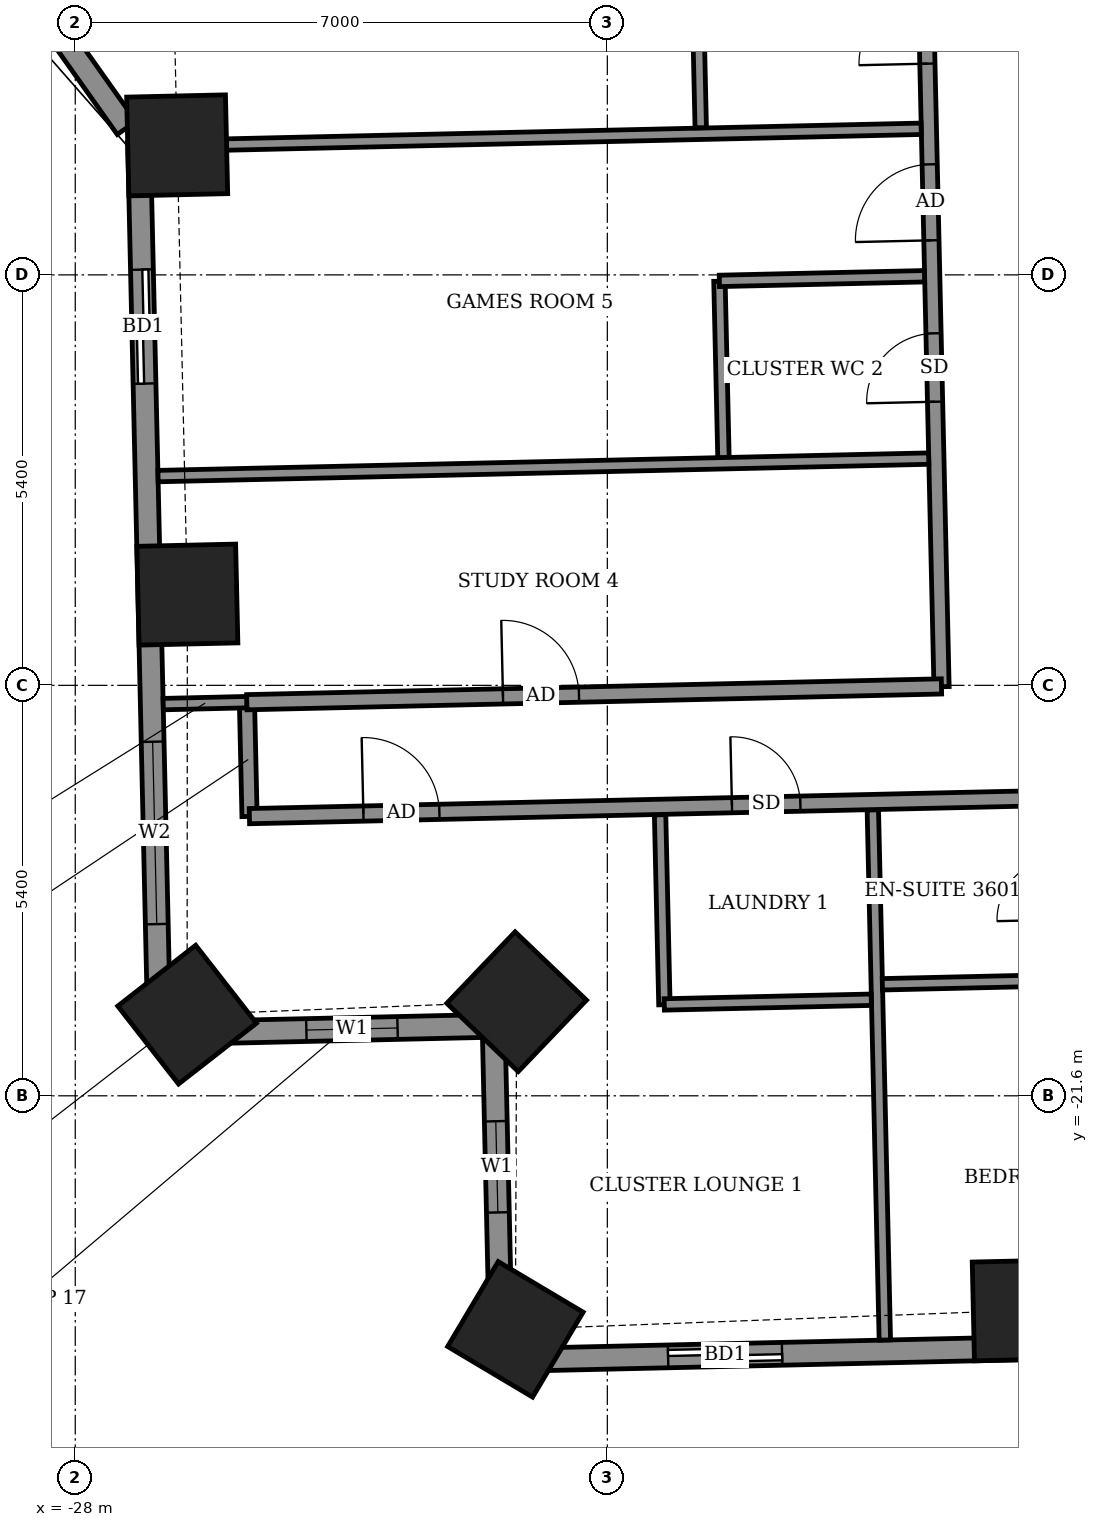
"""IFC4 building model, lengths in metres.
Left out: names, types, materials, properties, quantities, classifications, styles, units other than length and angle.
Written with IfcOpenShell. Run it as: python <this file> out.ifc"""

import sys

from ifc_helpers import new_model, si_unit, direction, frame, frame_2d, origin, origin_2d, place, context, subcontext, project, spatial, rectangle, extrude, element, fill, save


model = new_model("IFC4")
c1 = context("Model", 3, precision=1e-05, world=origin(), true_north=direction((0.0, 1.0)))
c2 = subcontext(c1, "Body", "Model", "MODEL_VIEW")
j1 = project(units=[si_unit("LENGTHUNIT", "METRE"), si_unit("PLANEANGLEUNIT", "RADIAN")], contexts=[c1])
p1 = place(None, origin())
s1 = spatial("IfcSite", under=j1, at=p1, CompositionType="ELEMENT")
p2 = place(p1, origin())
s2 = spatial("IfcBuilding", under=s1, at=p2, CompositionType="ELEMENT")
p3 = place(p2, frame((0.0, 0.0, 144.5)))
s3 = spatial("IfcBuildingStorey", under=s2, at=p3, CompositionType="ELEMENT", Elevation=144.5)
for number, where, z_axis, x_axis in (
    (1, (-26.659, -9.096, -0.55), (0.0, 0.0, 1.0), (0.023, -1.0, 0.0)),
    (2, (-26.525, -15.006, -0.55), (0.0, 0.0, 1.0), (0.023, -1.0, 0.0)),
    (3, (-26.529, -20.532, -0.55), (0.0, 0.0, 1.0), (0.615, -0.788, 0.0)),
    (4, (-22.193, -20.362, -0.55), (0.0, 0.0, 1.0), (0.723, -0.691, 0.0)),
    (5, (-22.209, -24.672, -0.55), (0.0, 0.0, 1.0), (0.859, -0.512, 0.0)),
    (6, (-15.535, -24.422, -0.55), (0.0, 0.0, 1.0), (1.0, 0.023, 0.0)),
):
    element("IfcColumn", number, at=place(p3, frame(where, z_axis=z_axis, x_axis=x_axis)), inside=s3, PredefinedType="COLUMN", context=c2, shape_type="SweptSolid", body=[
        extrude(rectangle(XDim=1.3, YDim=1.3, at=origin_2d()), origin(), (0.0, 0.0, 1.0), 3.6),
    ])
p4 = place(p3, frame((-29.388, -5.954, 0.0), z_axis=(0.0, 0.0, 1.0), x_axis=(0.578095163598, -0.815969351033, 0.0)))
e7 = element("IfcWall", 7, at=p4, inside=s3, PredefinedType="SOLIDWALL", context=c2, shape_type="SweptSolid", body=[
    extrude(rectangle(XDim=3.569, YDim=0.3, at=frame_2d((1.784, 0.0))), origin(), (0.0, 0.0, 1.0), 3.05),
])
p5 = place(p4, frame((0.338, 0.0, 0.9)))
e8 = element("IfcOpeningElement", 8, at=p5, cuts=e7, PredefinedType="OPENING", context=c2, shape_type="SweptSolid", body=[
    extrude(rectangle(XDim=1.2, YDim=1.5, at=frame_2d((0.6, 0.75))), frame((0.0, 0.16, 0.0), z_axis=(0.0, -1.0, 0.0), x_axis=(1.0, 0.0, 0.0)), (0.0, 0.0, 1.0), 0.32),
])
p6 = place(p3, frame((-27.161, -9.052, 0.0), z_axis=(0.0, 0.0, 1.0), x_axis=(0.022665616813, -0.999743101909, 0.0)))
e9 = element("IfcWall", 9, at=p6, inside=s3, PredefinedType="SOLIDWALL", context=c2, shape_type="SweptSolid", body=[
    extrude(rectangle(XDim=11.73, YDim=0.3, at=frame_2d((5.865, 0.0))), origin(), (0.0, 0.0, 1.0), 3.05),
])
p7 = place(p6, frame((1.679, 0.0, 0.0)))
e10 = element("IfcOpeningElement", 10, at=p7, cuts=e9, PredefinedType="OPENING", context=c2, shape_type="SweptSolid", body=[
    extrude(rectangle(XDim=1.5, YDim=2.4, at=frame_2d((0.75, 1.2))), frame((0.0, 0.16, 0.0), z_axis=(0.0, -1.0, 0.0), x_axis=(1.0, 0.0, 0.0)), (0.0, 0.0, 1.0), 0.32),
])
p8 = place(p6, frame((7.892, 0.0, 0.9)))
e11 = element("IfcOpeningElement", 11, at=p8, cuts=e9, PredefinedType="OPENING", context=c2, shape_type="SweptSolid", body=[
    extrude(rectangle(XDim=2.4, YDim=1.5, at=frame_2d((1.2, 0.75))), frame((0.0, 0.16, 0.0), z_axis=(0.0, -1.0, 0.0), x_axis=(1.0, 0.0, 0.0)), (0.0, 0.0, 1.0), 0.32),
])
p9 = place(p3, frame((-26.895, -20.779, 0.0), z_axis=(0.0, 0.0, 1.0), x_axis=(0.999741551724, 0.022733890051, 0.0)))
e12 = element("IfcWall", 12, at=p9, inside=s3, PredefinedType="SOLIDWALL", context=c2, shape_type="SweptSolid", body=[
    extrude(rectangle(XDim=4.886, YDim=0.3, at=frame_2d((2.443, 0.0))), origin(), (0.0, 0.0, 1.0), 2.55),
])
p10 = place(p9, frame((1.936, 0.0, 0.9)))
e13 = element("IfcOpeningElement", 13, at=p10, cuts=e12, PredefinedType="OPENING", context=c2, shape_type="SweptSolid", body=[
    extrude(rectangle(XDim=1.2, YDim=1.5, at=frame_2d((0.6, 0.75))), frame((0.0, 0.16, 0.0), z_axis=(0.0, -1.0, 0.0), x_axis=(1.0, 0.0, 0.0)), (0.0, 0.0, 1.0), 0.32),
])
p11 = place(p3, frame((-22.496, -20.679, 0.0), z_axis=(0.0, 0.0, 1.0), x_axis=(0.022749133868, -0.999741204967, 0.0)))
e14 = element("IfcWall", 14, at=p11, inside=s3, PredefinedType="SOLIDWALL", context=c2, shape_type="SweptSolid", body=[
    extrude(rectangle(XDim=4.4, YDim=0.3, at=frame_2d((2.2, 0.0))), origin(), (0.0, 0.0, 1.0), 2.55),
])
p12 = place(p11, frame((1.256, 0.0, 0.9)))
e15 = element("IfcOpeningElement", 15, at=p12, cuts=e14, PredefinedType="OPENING", context=c2, shape_type="SweptSolid", body=[
    extrude(rectangle(XDim=1.2, YDim=1.5, at=frame_2d((0.6, 0.75))), frame((0.0, 0.16, 0.0), z_axis=(0.0, -1.0, 0.0), x_axis=(1.0, 0.0, 0.0)), (0.0, 0.0, 1.0), 0.32),
])
p13 = place(p3, frame((-22.396, -25.078, 0.0), z_axis=(0.0, 0.0, 1.0), x_axis=(0.99974279854, 0.022678993965, 0.0)))
e16 = element("IfcWall", 16, at=p13, inside=s3, PredefinedType="SOLIDWALL", context=c2, shape_type="SweptSolid", body=[
    extrude(rectangle(XDim=41.844, YDim=0.3, at=frame_2d((20.922, 0.0))), origin(), (0.0, 0.0, 1.0), 3.05),
])
p14 = place(p13, frame((2.196, 0.0, 0.0)))
e17 = element("IfcOpeningElement", 17, at=p14, cuts=e16, PredefinedType="OPENING", context=c2, shape_type="SweptSolid", body=[
    extrude(rectangle(XDim=1.5, YDim=2.4, at=frame_2d((0.75, 1.2))), frame((0.0, 0.16, 0.0), z_axis=(0.0, -1.0, 0.0), x_axis=(1.0, 0.0, 0.0)), (0.0, 0.0, 1.0), 0.32),
])
p15 = place(p13, frame((7.737, 0.0, 0.0)))
e18 = element("IfcOpeningElement", 18, at=p15, cuts=e16, PredefinedType="OPENING", context=c2, shape_type="SweptSolid", body=[
    extrude(rectangle(XDim=1.2, YDim=2.4, at=frame_2d((0.6, 1.2))), frame((0.0, 0.16, 0.0), z_axis=(0.0, -1.0, 0.0), x_axis=(1.0, 0.0, 0.0)), (0.0, 0.0, 1.0), 0.32),
])
p16 = place(p13, frame((10.699, 0.0, 0.0)))
e19 = element("IfcOpeningElement", 19, at=p16, cuts=e16, PredefinedType="OPENING", context=c2, shape_type="SweptSolid", body=[
    extrude(rectangle(XDim=1.5, YDim=2.4, at=frame_2d((0.75, 1.2))), frame((0.0, 0.16, 0.0), z_axis=(0.0, -1.0, 0.0), x_axis=(1.0, 0.0, 0.0)), (0.0, 0.0, 1.0), 0.32),
])
p17 = place(p13, frame((15.549, 0.0, 0.0)))
e20 = element("IfcOpeningElement", 20, at=p17, cuts=e16, PredefinedType="OPENING", context=c2, shape_type="SweptSolid", body=[
    extrude(rectangle(XDim=1.5, YDim=2.4, at=frame_2d((0.75, 1.2))), frame((0.0, 0.16, 0.0), z_axis=(0.0, -1.0, 0.0), x_axis=(1.0, 0.0, 0.0)), (0.0, 0.0, 1.0), 0.32),
])
p18 = place(p13, frame((18.661, 0.0, 0.0)))
e21 = element("IfcOpeningElement", 21, at=p18, cuts=e16, PredefinedType="OPENING", context=c2, shape_type="SweptSolid", body=[
    extrude(rectangle(XDim=1.5, YDim=2.4, at=frame_2d((0.75, 1.2))), frame((0.0, 0.16, 0.0), z_axis=(0.0, -1.0, 0.0), x_axis=(1.0, 0.0, 0.0)), (0.0, 0.0, 1.0), 0.32),
])
p19 = place(p13, frame((24.125, 0.0, 0.0)))
e22 = element("IfcOpeningElement", 22, at=p19, cuts=e16, PredefinedType="OPENING", context=c2, shape_type="SweptSolid", body=[
    extrude(rectangle(XDim=1.5, YDim=2.4, at=frame_2d((0.75, 1.2))), frame((0.0, 0.16, 0.0), z_axis=(0.0, -1.0, 0.0), x_axis=(1.0, 0.0, 0.0)), (0.0, 0.0, 1.0), 0.32),
])
p20 = place(p13, frame((29.298, 0.0, 0.0)))
e23 = element("IfcOpeningElement", 23, at=p20, cuts=e16, PredefinedType="OPENING", context=c2, shape_type="SweptSolid", body=[
    extrude(rectangle(XDim=1.5, YDim=2.4, at=frame_2d((0.75, 1.2))), frame((0.0, 0.16, 0.0), z_axis=(0.0, -1.0, 0.0), x_axis=(1.0, 0.0, 0.0)), (0.0, 0.0, 1.0), 0.32),
])
p21 = place(p13, frame((32.41, 0.0, 0.0)))
e24 = element("IfcOpeningElement", 24, at=p21, cuts=e16, PredefinedType="OPENING", context=c2, shape_type="SweptSolid", body=[
    extrude(rectangle(XDim=1.5, YDim=2.4, at=frame_2d((0.75, 1.2))), frame((0.0, 0.16, 0.0), z_axis=(0.0, -1.0, 0.0), x_axis=(1.0, 0.0, 0.0)), (0.0, 0.0, 1.0), 0.32),
])
p22 = place(p13, frame((37.324, 0.0, 0.9)))
e25 = element("IfcOpeningElement", 25, at=p22, cuts=e16, PredefinedType="OPENING", context=c2, shape_type="SweptSolid", body=[
    extrude(rectangle(XDim=2.4, YDim=1.5, at=frame_2d((1.2, 0.75))), frame((0.0, 0.16, 0.0), z_axis=(0.0, -1.0, 0.0), x_axis=(1.0, 0.0, 0.0)), (0.0, 0.0, 1.0), 0.32),
])
p23 = place(p3, frame((-17.349, -24.813, 0.0), z_axis=(0.0, 0.0, 1.0), x_axis=(-0.022644288452, 0.999743585226, 0.0)))
e26 = element("IfcWall", 26, at=p23, inside=s3, PredefinedType="PARTITIONING", context=c2, shape_type="SweptSolid", body=[
    extrude(rectangle(XDim=6.976, YDim=0.15, at=frame_2d((3.488, 0.0))), origin(), (0.0, 0.0, 1.0), 2.55),
])
p24 = place(p3, frame((-20.249, -20.402, 0.0), z_axis=(0.0, 0.0, 1.0), x_axis=(-0.022756903044, 0.999741028149, 0.0)))
e27 = element("IfcWall", 27, at=p24, inside=s3, PredefinedType="PARTITIONING", context=c2, shape_type="SweptSolid", body=[
    extrude(rectangle(XDim=2.5, YDim=0.15, at=frame_2d((1.25, 0.0))), origin(), (0.0, 0.0, 1.0), 3.05),
])
p25 = place(p3, frame((-20.251, -20.398, 0.0), z_axis=(0.0, 0.0, 1.0), x_axis=(0.999740955847, 0.022760079124, 0.0)))
e28 = element("IfcWall", 28, at=p25, inside=s3, PredefinedType="PARTITIONING", context=c2, shape_type="SweptSolid", body=[
    extrude(rectangle(XDim=2.725, YDim=0.15, at=frame_2d((1.362, 0.0))), origin(), (0.0, 0.0, 1.0), 3.05),
])
p26 = place(p3, frame((-17.382, -20.133, 0.0), z_axis=(0.0, 0.0, 1.0), x_axis=(0.99974053329, 0.022778632478, 0.0)))
e29 = element("IfcWall", 29, at=p26, inside=s3, PredefinedType="PARTITIONING", context=c2, shape_type="SweptSolid", body=[
    extrude(rectangle(XDim=2.326, YDim=0.15, at=frame_2d((1.163, 0.0))), origin(), (0.0, 0.0, 1.0), 3.05),
])
p27 = place(p3, frame((-25.707, -17.925, 0.0), z_axis=(0.0, 0.0, 1.0), x_axis=(-0.022617910375, 0.999744182344, 0.0)))
e30 = element("IfcWall", 30, at=p27, inside=s3, PredefinedType="PARTITIONING", context=c2, shape_type="SweptSolid", body=[
    extrude(rectangle(XDim=1.5, YDim=0.2, at=frame_2d((0.75, 0.0))), origin(), (0.0, 0.0, 1.0), 3.05),
])
p28 = place(p3, frame((-25.709, -17.921, 0.0), z_axis=(0.0, 0.0, 1.0), x_axis=(0.999742764922, 0.022680475901, 0.0)))
e31 = element("IfcWall", 31, at=p28, inside=s3, PredefinedType="PARTITIONING", context=c2, shape_type="SweptSolid", body=[
    extrude(rectangle(XDim=10.84, YDim=0.2, at=frame_2d((5.42, 0.0))), origin(), (0.0, 0.0, 1.0), 3.05),
])
p29 = place(p28, frame((1.5, 0.0, 0.0)))
e32 = element("IfcOpeningElement", 32, at=p29, cuts=e31, PredefinedType="OPENING", context=c2, shape_type="SweptSolid", body=[
    extrude(rectangle(XDim=1.0, YDim=2.1, at=frame_2d((0.5, 1.05))), frame((0.0, 0.11, 0.0), z_axis=(0.0, -1.0, 0.0), x_axis=(1.0, 0.0, 0.0)), (0.0, 0.0, 1.0), 0.22),
])
p30 = place(p28, frame((6.35, 0.0, 0.0)))
e33 = element("IfcOpeningElement", 33, at=p30, cuts=e31, PredefinedType="OPENING", context=c2, shape_type="SweptSolid", body=[
    extrude(rectangle(XDim=0.9, YDim=2.1, at=frame_2d((0.45, 1.05))), frame((0.0, 0.11, 0.0), z_axis=(0.0, -1.0, 0.0), x_axis=(1.0, 0.0, 0.0)), (0.0, 0.0, 1.0), 0.22),
])
p31 = place(p3, frame((-16.603, -16.218, 0.0), z_axis=(0.0, 0.0, 1.0), x_axis=(-0.022698146637, 0.999742363881, 0.0)))
e34 = element("IfcWall", 34, at=p31, inside=s3, PredefinedType="PARTITIONING", context=c2, shape_type="SweptSolid", body=[
    extrude(rectangle(XDim=28.374, YDim=0.2, at=frame_2d((14.187, 0.0))), origin(), (0.0, 0.0, 1.0), 3.05),
])
p32 = place(p31, frame((22.724, 0.0, 0.0)))
e35 = element("IfcOpeningElement", 35, at=p32, cuts=e34, PredefinedType="OPENING", context=c2, shape_type="SweptSolid", body=[
    extrude(rectangle(XDim=1.0, YDim=2.1, at=frame_2d((0.5, 1.05))), frame((0.0, 0.11, 0.0), z_axis=(0.0, -1.0, 0.0), x_axis=(1.0, 0.0, 0.0)), (0.0, 0.0, 1.0), 0.22),
])
p33 = place(p31, frame((18.008, 0.0, 0.0)))
e36 = element("IfcOpeningElement", 36, at=p33, cuts=e34, PredefinedType="OPENING", context=c2, shape_type="SweptSolid", body=[
    extrude(rectangle(XDim=1.0, YDim=2.1, at=frame_2d((0.5, 1.05))), frame((0.0, 0.11, 0.0), z_axis=(0.0, -1.0, 0.0), x_axis=(1.0, 0.0, 0.0)), (0.0, 0.0, 1.0), 0.22),
])
p34 = place(p31, frame((14.699, 0.0, 0.0)))
e37 = element("IfcOpeningElement", 37, at=p34, cuts=e34, PredefinedType="OPENING", context=c2, shape_type="SweptSolid", body=[
    extrude(rectangle(XDim=1.0, YDim=2.1, at=frame_2d((0.5, 1.05))), frame((0.0, 0.11, 0.0), z_axis=(0.0, -1.0, 0.0), x_axis=(1.0, 0.0, 0.0)), (0.0, 0.0, 1.0), 0.22),
])
p35 = place(p31, frame((12.549, 0.0, 0.0)))
e38 = element("IfcOpeningElement", 38, at=p35, cuts=e34, PredefinedType="OPENING", context=c2, shape_type="SweptSolid", body=[
    extrude(rectangle(XDim=0.9, YDim=2.1, at=frame_2d((0.45, 1.05))), frame((0.0, 0.11, 0.0), z_axis=(0.0, -1.0, 0.0), x_axis=(1.0, 0.0, 0.0)), (0.0, 0.0, 1.0), 0.22),
])
p36 = place(p31, frame((10.324, 0.0, 0.0)))
e39 = element("IfcOpeningElement", 39, at=p36, cuts=e34, PredefinedType="OPENING", context=c2, shape_type="SweptSolid", body=[
    extrude(rectangle(XDim=1.0, YDim=2.1, at=frame_2d((0.5, 1.05))), frame((0.0, 0.11, 0.0), z_axis=(0.0, -1.0, 0.0), x_axis=(1.0, 0.0, 0.0)), (0.0, 0.0, 1.0), 0.22),
])
p37 = place(p31, frame((8.199, 0.0, 0.0)))
e40 = element("IfcOpeningElement", 40, at=p37, cuts=e34, PredefinedType="OPENING", context=c2, shape_type="SweptSolid", body=[
    extrude(rectangle(XDim=0.9, YDim=2.1, at=frame_2d((0.45, 1.05))), frame((0.0, 0.11, 0.0), z_axis=(0.0, -1.0, 0.0), x_axis=(1.0, 0.0, 0.0)), (0.0, 0.0, 1.0), 0.22),
])
p38 = place(p31, frame((5.874, 0.0, 0.0)))
e41 = element("IfcOpeningElement", 41, at=p38, cuts=e34, PredefinedType="OPENING", context=c2, shape_type="SweptSolid", body=[
    extrude(rectangle(XDim=1.0, YDim=2.1, at=frame_2d((0.5, 1.05))), frame((0.0, 0.11, 0.0), z_axis=(0.0, -1.0, 0.0), x_axis=(1.0, 0.0, 0.0)), (0.0, 0.0, 1.0), 0.22),
])
p39 = place(p31, frame((3.75, 0.0, 0.0)))
e42 = element("IfcOpeningElement", 42, at=p39, cuts=e34, PredefinedType="OPENING", context=c2, shape_type="SweptSolid", body=[
    extrude(rectangle(XDim=0.9, YDim=2.1, at=frame_2d((0.45, 1.05))), frame((0.0, 0.11, 0.0), z_axis=(0.0, -1.0, 0.0), x_axis=(1.0, 0.0, 0.0)), (0.0, 0.0, 1.0), 0.22),
])
p40 = place(p3, frame((-26.843, -16.447, 0.0), z_axis=(0.0, 0.0, 1.0), x_axis=(0.999720170098, 0.023655475055, 0.0)))
e43 = element("IfcWall", 43, at=p40, inside=s3, PredefinedType="PARTITIONING", context=c2, shape_type="SweptSolid", body=[
    extrude(rectangle(XDim=1.104, YDim=0.15, at=frame_2d((0.552, 0.0))), origin(), (0.0, 0.0, 1.0), 2.55),
])
p41 = place(p3, frame((-25.743, -16.422, 0.0), z_axis=(0.0, 0.0, 1.0), x_axis=(0.999741076645, 0.022754772455, 0.0)))
e44 = element("IfcWall", 44, at=p41, inside=s3, PredefinedType="PARTITIONING", context=c2, shape_type="SweptSolid", body=[
    extrude(rectangle(XDim=9.141, YDim=0.2, at=frame_2d((4.571, 0.0))), origin(), (0.0, 0.0, 1.0), 3.05),
])
p42 = place(p41, frame((3.371, 0.0, 0.0)))
e45 = element("IfcOpeningElement", 45, at=p42, cuts=e44, PredefinedType="OPENING", context=c2, shape_type="SweptSolid", body=[
    extrude(rectangle(XDim=1.0, YDim=2.1, at=frame_2d((0.5, 1.05))), frame((0.0, 0.11, 0.0), z_axis=(0.0, -1.0, 0.0), x_axis=(1.0, 0.0, 0.0)), (0.0, 0.0, 1.0), 0.22),
])
p43 = place(p3, frame((-19.472, -13.207, 0.0), z_axis=(0.0, 0.0, 1.0), x_axis=(-0.02279059109, 0.999740260747, 0.0)))
e46 = element("IfcWall", 46, at=p43, inside=s3, PredefinedType="PARTITIONING", context=c2, shape_type="SweptSolid", body=[
    extrude(rectangle(XDim=2.324, YDim=0.15, at=frame_2d((1.162, 0.0))), origin(), (0.0, 0.0, 1.0), 3.05),
])
p44 = place(p3, frame((-26.911, -13.447, 0.0), z_axis=(0.0, 0.0, 1.0), x_axis=(0.999742841246, 0.022677111331, 0.0)))
e47 = element("IfcWall", 47, at=p44, inside=s3, PredefinedType="PARTITIONING", context=c2, shape_type="SweptSolid", body=[
    extrude(rectangle(XDim=10.142, YDim=0.15, at=frame_2d((5.071, 0.0))), origin(), (0.0, 0.0, 1.0), 2.55),
])
p45 = place(p3, frame((-19.526, -10.879, 0.0), z_axis=(0.0, 0.0, 1.0), x_axis=(0.999746436932, 0.022518033722, 0.0)))
e48 = element("IfcWall", 48, at=p45, inside=s3, PredefinedType="PARTITIONING", context=c2, shape_type="SweptSolid", body=[
    extrude(rectangle(XDim=2.7, YDim=0.15, at=frame_2d((1.35, 0.0))), origin(), (0.0, 0.0, 1.0), 3.05),
])
p46 = place(p3, frame((-27.01, -9.108, 0.0), z_axis=(0.0, 0.0, 1.0), x_axis=(0.999742841246, 0.022677111331, 0.0)))
e49 = element("IfcWall", 49, at=p46, inside=s3, PredefinedType="PARTITIONING", context=c2, shape_type="SweptSolid", body=[
    extrude(rectangle(XDim=10.142, YDim=0.15, at=frame_2d((5.071, 0.0))), origin(), (0.0, 0.0, 1.0), 3.05),
])
p47 = place(p3, frame((-19.771, -8.864, 0.0), z_axis=(0.0, 0.0, 1.0), x_axis=(-0.022532486354, 0.9997461113, 0.0)))
e50 = element("IfcWall", 50, at=p47, inside=s3, PredefinedType="PARTITIONING", context=c2, shape_type="SweptSolid", body=[
    extrude(rectangle(XDim=2.525, YDim=0.15, at=frame_2d((1.262, 0.0))), origin(), (0.0, 0.0, 1.0), 3.05),
])
p48 = place(p7, origin())
e51 = element("IfcDoor", 51, at=p48, inside=s3, OperationType="SLIDING_TO_LEFT", PredefinedType="DOOR", context=c2, shape_type="SweptSolid", body=[
    extrude(rectangle(XDim=1.5, YDim=2.4, at=frame_2d((0.75, 1.2))), frame((0.0, 0.025, 0.0), z_axis=(0.0, -1.0, 0.0), x_axis=(1.0, 0.0, 0.0)), (0.0, 0.0, 1.0), 0.05),
])
fill(e10, e51)
p49 = place(p8, origin())
e52 = element("IfcWindow", 52, at=p49, inside=s3, PartitioningType="DOUBLE_PANEL_VERTICAL", PredefinedType="WINDOW", context=c2, shape_type="SweptSolid", body=[
    extrude(rectangle(XDim=2.4, YDim=1.5, at=frame_2d((1.2, 0.75))), frame((0.0, 0.03, 0.0), z_axis=(0.0, -1.0, 0.0), x_axis=(1.0, 0.0, 0.0)), (0.0, 0.0, 1.0), 0.06),
])
fill(e11, e52)
p50 = place(p10, origin())
e53 = element("IfcWindow", 53, at=p50, inside=s3, PartitioningType="SINGLE_PANEL", PredefinedType="WINDOW", context=c2, shape_type="SweptSolid", body=[
    extrude(rectangle(XDim=1.2, YDim=1.5, at=frame_2d((0.6, 0.75))), frame((0.0, 0.03, 0.0), z_axis=(0.0, -1.0, 0.0), x_axis=(1.0, 0.0, 0.0)), (0.0, 0.0, 1.0), 0.06),
])
fill(e13, e53)
p51 = place(p12, origin())
e54 = element("IfcWindow", 54, at=p51, inside=s3, PartitioningType="SINGLE_PANEL", PredefinedType="WINDOW", context=c2, shape_type="SweptSolid", body=[
    extrude(rectangle(XDim=1.2, YDim=1.5, at=frame_2d((0.6, 0.75))), frame((0.0, 0.03, 0.0), z_axis=(0.0, -1.0, 0.0), x_axis=(1.0, 0.0, 0.0)), (0.0, 0.0, 1.0), 0.06),
])
fill(e15, e54)
p52 = place(p14, origin())
e55 = element("IfcDoor", 55, at=p52, inside=s3, OperationType="SLIDING_TO_LEFT", PredefinedType="DOOR", context=c2, shape_type="SweptSolid", body=[
    extrude(rectangle(XDim=1.5, YDim=2.4, at=frame_2d((0.75, 1.2))), frame((0.0, 0.025, 0.0), z_axis=(0.0, -1.0, 0.0), x_axis=(1.0, 0.0, 0.0)), (0.0, 0.0, 1.0), 0.05),
])
fill(e17, e55)
p53 = place(p29, origin())
e56 = element("IfcDoor", 56, at=p53, inside=s3, OperationType="SINGLE_SWING_LEFT", PredefinedType="DOOR", context=c2, shape_type="SweptSolid", body=[
    extrude(rectangle(XDim=1.0, YDim=2.1, at=frame_2d((0.5, 1.05))), frame((0.0, 0.025, 0.0), z_axis=(0.0, -1.0, 0.0), x_axis=(1.0, 0.0, 0.0)), (0.0, 0.0, 1.0), 0.05),
])
fill(e32, e56)
p54 = place(p30, origin())
e57 = element("IfcDoor", 57, at=p54, inside=s3, OperationType="SINGLE_SWING_LEFT", PredefinedType="DOOR", context=c2, shape_type="SweptSolid", body=[
    extrude(rectangle(XDim=0.9, YDim=2.1, at=frame_2d((0.45, 1.05))), frame((0.0, 0.025, 0.0), z_axis=(0.0, -1.0, 0.0), x_axis=(1.0, 0.0, 0.0)), (0.0, 0.0, 1.0), 0.05),
])
fill(e33, e57)
p55 = place(p37, origin())
e58 = element("IfcDoor", 58, at=p55, inside=s3, OperationType="SINGLE_SWING_RIGHT", PredefinedType="DOOR", context=c2, shape_type="SweptSolid", body=[
    extrude(rectangle(XDim=0.9, YDim=2.1, at=frame_2d((0.45, 1.05))), frame((0.0, 0.025, 0.0), z_axis=(0.0, -1.0, 0.0), x_axis=(1.0, 0.0, 0.0)), (0.0, 0.0, 1.0), 0.05),
])
fill(e40, e58)
p56 = place(p38, origin())
e59 = element("IfcDoor", 59, at=p56, inside=s3, OperationType="SINGLE_SWING_LEFT", PredefinedType="DOOR", context=c2, shape_type="SweptSolid", body=[
    extrude(rectangle(XDim=1.0, YDim=2.1, at=frame_2d((0.5, 1.05))), frame((0.0, 0.025, 0.0), z_axis=(0.0, -1.0, 0.0), x_axis=(1.0, 0.0, 0.0)), (0.0, 0.0, 1.0), 0.05),
])
fill(e41, e59)
p57 = place(p39, origin())
e60 = element("IfcDoor", 60, at=p57, inside=s3, OperationType="SINGLE_SWING_LEFT", PredefinedType="DOOR", context=c2, shape_type="SweptSolid", body=[
    extrude(rectangle(XDim=0.9, YDim=2.1, at=frame_2d((0.45, 1.05))), frame((0.0, 0.025, 0.0), z_axis=(0.0, -1.0, 0.0), x_axis=(1.0, 0.0, 0.0)), (0.0, 0.0, 1.0), 0.05),
])
fill(e42, e60)
p58 = place(p42, origin())
e61 = element("IfcDoor", 61, at=p58, inside=s3, OperationType="SINGLE_SWING_RIGHT", PredefinedType="DOOR", context=c2, shape_type="SweptSolid", body=[
    extrude(rectangle(XDim=1.0, YDim=2.1, at=frame_2d((0.5, 1.05))), frame((0.0, 0.025, 0.0), z_axis=(0.0, -1.0, 0.0), x_axis=(1.0, 0.0, 0.0)), (0.0, 0.0, 1.0), 0.05),
])
fill(e45, e61)
save(model, sys.argv[1])
